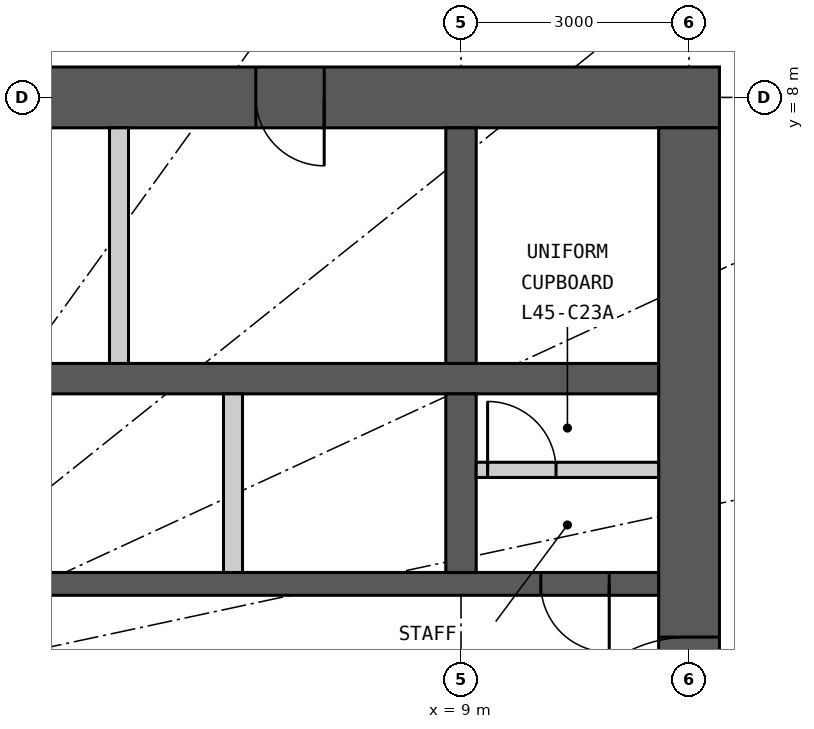
"""IFC4 building model, lengths in metres.
Left out: names, types, materials, properties, quantities, classifications, styles, units other than length and angle.
Written with IfcOpenShell. Run it as: python <this file> out.ifc"""

import sys

from ifc_helpers import new_model, si_unit, direction, frame, frame_2d, origin, place, context, subcontext, project, spatial, rectangle, extrude, element, fill, save


model = new_model("IFC4")
c1 = context("Model", 3, precision=1e-05, world=origin(), true_north=direction((0.0, 1.0)))
c2 = subcontext(c1, "Body", "Model", "MODEL_VIEW")
j1 = project(units=[si_unit("LENGTHUNIT", "METRE"), si_unit("PLANEANGLEUNIT", "RADIAN")], contexts=[c1])
p1 = place(None, origin())
s1 = spatial("IfcSite", under=j1, at=p1, CompositionType="ELEMENT")
p2 = place(p1, origin())
s2 = spatial("IfcBuilding", under=s1, at=p2, CompositionType="ELEMENT")
p3 = place(p2, frame((0.0, 0.0, 169.8)))
s3 = spatial("IfcBuildingStorey", under=s2, at=p3, CompositionType="ELEMENT", Elevation=169.8)
p4 = place(p3, frame((-12.4, 8.0, 0.0), z_axis=(0.0, 0.0, 1.0), x_axis=(1.0, 0.0, 0.0)))
e1 = element("IfcWall", 1, at=p4, inside=s3, PredefinedType="SHEAR", context=c2, shape_type="SweptSolid", body=[
    extrude(rectangle(XDim=24.8, YDim=0.8, at=frame_2d((12.4, 0.0))), origin(), (0.0, 0.0, 1.0), 3.3),
])
p5 = place(p4, frame((11.1, 0.0, 0.0)))
e2 = element("IfcOpeningElement", 2, at=p5, cuts=e1, PredefinedType="OPENING", context=c2, shape_type="SweptSolid", body=[
    extrude(rectangle(XDim=1.2, YDim=2.2, at=frame_2d((0.6, 1.1))), frame((0.0, 0.41, 0.0), z_axis=(0.0, -1.0, 0.0), x_axis=(1.0, 0.0, 0.0)), (0.0, 0.0, 1.0), 0.82),
])
p6 = place(p4, frame((18.7, 0.0, 0.0)))
e3 = element("IfcOpeningElement", 3, at=p6, cuts=e1, PredefinedType="OPENING", context=c2, shape_type="SweptSolid", body=[
    extrude(rectangle(XDim=0.9, YDim=2.2, at=frame_2d((0.45, 1.1))), frame((0.0, 0.41, 0.0), z_axis=(0.0, -1.0, 0.0), x_axis=(1.0, 0.0, 0.0)), (0.0, 0.0, 1.0), 0.82),
])
p7 = place(p3, frame((12.0, -7.6, 0.0), z_axis=(0.0, 0.0, 1.0), x_axis=(0.0, 1.0, 0.0)))
e4 = element("IfcWall", 4, at=p7, inside=s3, PredefinedType="SHEAR", context=c2, shape_type="SweptSolid", body=[
    extrude(rectangle(XDim=15.2, YDim=0.8, at=frame_2d((7.6, 0.0))), origin(), (0.0, 0.0, 1.0), 3.3),
])
p8 = place(p7, frame((6.7, 0.0, 0.0)))
e5 = element("IfcOpeningElement", 5, at=p8, cuts=e4, PredefinedType="OPENING", context=c2, shape_type="SweptSolid", body=[
    extrude(rectangle(XDim=1.8, YDim=2.2, at=frame_2d((0.9, 1.1))), frame((0.0, 0.41, 0.0), z_axis=(0.0, -1.0, 0.0), x_axis=(1.0, 0.0, 0.0)), (0.0, 0.0, 1.0), 0.82),
])
p9 = place(p3, frame((-11.6, 4.3, 0.0), z_axis=(0.0, 0.0, 1.0), x_axis=(1.0, 0.0, 0.0)))
e6 = element("IfcWall", 6, at=p9, inside=s3, PredefinedType="SHEAR", context=c2, shape_type="SweptSolid", body=[
    extrude(rectangle(XDim=23.2, YDim=0.4, at=frame_2d((11.6, 0.0))), origin(), (0.0, 0.0, 1.0), 3.3),
])
p10 = place(p3, frame((-11.6, 1.6, 0.0), z_axis=(0.0, 0.0, 1.0), x_axis=(1.0, 0.0, 0.0)))
e7 = element("IfcWall", 7, at=p10, inside=s3, PredefinedType="SHEAR", context=c2, shape_type="SweptSolid", body=[
    extrude(rectangle(XDim=23.2, YDim=0.3, at=frame_2d((11.6, 0.0))), origin(), (0.0, 0.0, 1.0), 3.3),
])
p11 = place(p10, frame((9.55, 0.0, 0.0)))
e8 = element("IfcOpeningElement", 8, at=p11, cuts=e7, PredefinedType="OPENING", context=c2, shape_type="SweptSolid", body=[
    extrude(rectangle(XDim=1.1, YDim=2.2, at=frame_2d((0.55, 1.1))), frame((0.0, 0.16, 0.0), z_axis=(0.0, -1.0, 0.0), x_axis=(1.0, 0.0, 0.0)), (0.0, 0.0, 1.0), 0.32),
])
p12 = place(p10, frame((12.55, 0.0, 0.0)))
e9 = element("IfcOpeningElement", 9, at=p12, cuts=e7, PredefinedType="OPENING", context=c2, shape_type="SweptSolid", body=[
    extrude(rectangle(XDim=1.1, YDim=2.2, at=frame_2d((0.55, 1.1))), frame((0.0, 0.16, 0.0), z_axis=(0.0, -1.0, 0.0), x_axis=(1.0, 0.0, 0.0)), (0.0, 0.0, 1.0), 0.32),
])
p13 = place(p10, frame((0.65, 0.0, 0.0)))
e10 = element("IfcOpeningElement", 10, at=p13, cuts=e7, PredefinedType="OPENING", context=c2, shape_type="SweptSolid", body=[
    extrude(rectangle(XDim=0.9, YDim=2.2, at=frame_2d((0.45, 1.1))), frame((0.0, 0.16, 0.0), z_axis=(0.0, -1.0, 0.0), x_axis=(1.0, 0.0, 0.0)), (0.0, 0.0, 1.0), 0.32),
])
p14 = place(p10, frame((5.15, 0.0, 0.0)))
e11 = element("IfcOpeningElement", 11, at=p14, cuts=e7, PredefinedType="OPENING", context=c2, shape_type="SweptSolid", body=[
    extrude(rectangle(XDim=0.9, YDim=2.2, at=frame_2d((0.45, 1.1))), frame((0.0, 0.16, 0.0), z_axis=(0.0, -1.0, 0.0), x_axis=(1.0, 0.0, 0.0)), (0.0, 0.0, 1.0), 0.32),
])
p15 = place(p10, frame((21.65, 0.0, 0.0)))
e12 = element("IfcOpeningElement", 12, at=p15, cuts=e7, PredefinedType="OPENING", context=c2, shape_type="SweptSolid", body=[
    extrude(rectangle(XDim=0.9, YDim=2.2, at=frame_2d((0.45, 1.1))), frame((0.0, 0.16, 0.0), z_axis=(0.0, -1.0, 0.0), x_axis=(1.0, 0.0, 0.0)), (0.0, 0.0, 1.0), 0.32),
])
p16 = place(p3, frame((9.0, 4.5, 0.0), z_axis=(0.0, 0.0, 1.0), x_axis=(0.0, 1.0, 0.0)))
e13 = element("IfcWall", 13, at=p16, inside=s3, PredefinedType="SHEAR", context=c2, shape_type="SweptSolid", body=[
    extrude(rectangle(XDim=3.1, YDim=0.4, at=frame_2d((1.55, 0.0))), origin(), (0.0, 0.0, 1.0), 3.3),
])
p17 = place(p3, frame((9.0, 1.75, 0.0), z_axis=(0.0, 0.0, 1.0), x_axis=(0.0, 1.0, 0.0)))
e14 = element("IfcWall", 14, at=p17, inside=s3, PredefinedType="SHEAR", context=c2, shape_type="SweptSolid", body=[
    extrude(rectangle(XDim=2.35, YDim=0.4, at=frame_2d((1.175, 0.0))), origin(), (0.0, 0.0, 1.0), 3.3),
])
p18 = place(p3, frame((4.5, 4.5, 0.0), z_axis=(0.0, 0.0, 1.0), x_axis=(0.0, 1.0, 0.0)))
e15 = element("IfcWall", 15, at=p18, inside=s3, PredefinedType="PARTITIONING", context=c2, shape_type="SweptSolid", body=[
    extrude(rectangle(XDim=3.1, YDim=0.25, at=frame_2d((1.55, 0.0))), origin(), (0.0, 0.0, 1.0), 3.3),
])
p19 = place(p3, frame((6.0, 1.75, 0.0), z_axis=(0.0, 0.0, 1.0), x_axis=(0.0, 1.0, 0.0)))
e16 = element("IfcWall", 16, at=p19, inside=s3, PredefinedType="PARTITIONING", context=c2, shape_type="SweptSolid", body=[
    extrude(rectangle(XDim=2.35, YDim=0.25, at=frame_2d((1.175, 0.0))), origin(), (0.0, 0.0, 1.0), 3.3),
])
p20 = place(p3, frame((9.2, 3.1, 0.0), z_axis=(0.0, 0.0, 1.0), x_axis=(1.0, 0.0, 0.0)))
e17 = element("IfcWall", 17, at=p20, inside=s3, PredefinedType="PARTITIONING", context=c2, shape_type="SweptSolid", body=[
    extrude(rectangle(XDim=2.4, YDim=0.2, at=frame_2d((1.2, 0.0))), origin(), (0.0, 0.0, 1.0), 3.12),
])
p21 = place(p20, frame((0.15, 0.0, 0.0)))
e18 = element("IfcOpeningElement", 18, at=p21, cuts=e17, PredefinedType="OPENING", context=c2, shape_type="SweptSolid", body=[
    extrude(rectangle(XDim=0.9, YDim=2.2, at=frame_2d((0.45, 1.1))), frame((0.0, 0.11, 0.0), z_axis=(0.0, -1.0, 0.0), x_axis=(1.0, 0.0, 0.0)), (0.0, 0.0, 1.0), 0.22),
])
p22 = place(p6, origin())
e19 = element("IfcDoor", 19, at=p22, inside=s3, OperationType="SINGLE_SWING_RIGHT", PredefinedType="DOOR", context=c2, shape_type="SweptSolid", body=[
    extrude(rectangle(XDim=0.9, YDim=2.2, at=frame_2d((0.45, 1.1))), frame((0.0, 0.025, 0.0), z_axis=(0.0, -1.0, 0.0), x_axis=(1.0, 0.0, 0.0)), (0.0, 0.0, 1.0), 0.05),
])
fill(e3, e19)
p23 = place(p15, origin())
e20 = element("IfcDoor", 20, at=p23, inside=s3, OperationType="SINGLE_SWING_RIGHT", PredefinedType="DOOR", context=c2, shape_type="SweptSolid", body=[
    extrude(rectangle(XDim=0.9, YDim=2.2, at=frame_2d((0.45, 1.1))), frame((0.0, 0.025, 0.0), z_axis=(0.0, -1.0, 0.0), x_axis=(1.0, 0.0, 0.0)), (0.0, 0.0, 1.0), 0.05),
])
fill(e12, e20)
p24 = place(p21, origin())
e21 = element("IfcDoor", 21, at=p24, inside=s3, OperationType="SINGLE_SWING_LEFT", PredefinedType="DOOR", context=c2, shape_type="SweptSolid", body=[
    extrude(rectangle(XDim=0.9, YDim=2.2, at=frame_2d((0.45, 1.1))), frame((0.0, 0.025, 0.0), z_axis=(0.0, -1.0, 0.0), x_axis=(1.0, 0.0, 0.0)), (0.0, 0.0, 1.0), 0.05),
])
fill(e18, e21)
p25 = place(p8, origin())
e22 = element("IfcDoor", 22, at=p25, inside=s3, OperationType="DOUBLE_DOOR_DOUBLE_SWING", PredefinedType="DOOR", context=c2, shape_type="SweptSolid", body=[
    extrude(rectangle(XDim=1.8, YDim=2.2, at=frame_2d((0.9, 1.1))), frame((0.0, 0.025, 0.0), z_axis=(0.0, -1.0, 0.0), x_axis=(1.0, 0.0, 0.0)), (0.0, 0.0, 1.0), 0.05),
])
fill(e5, e22)
save(model, sys.argv[1])
